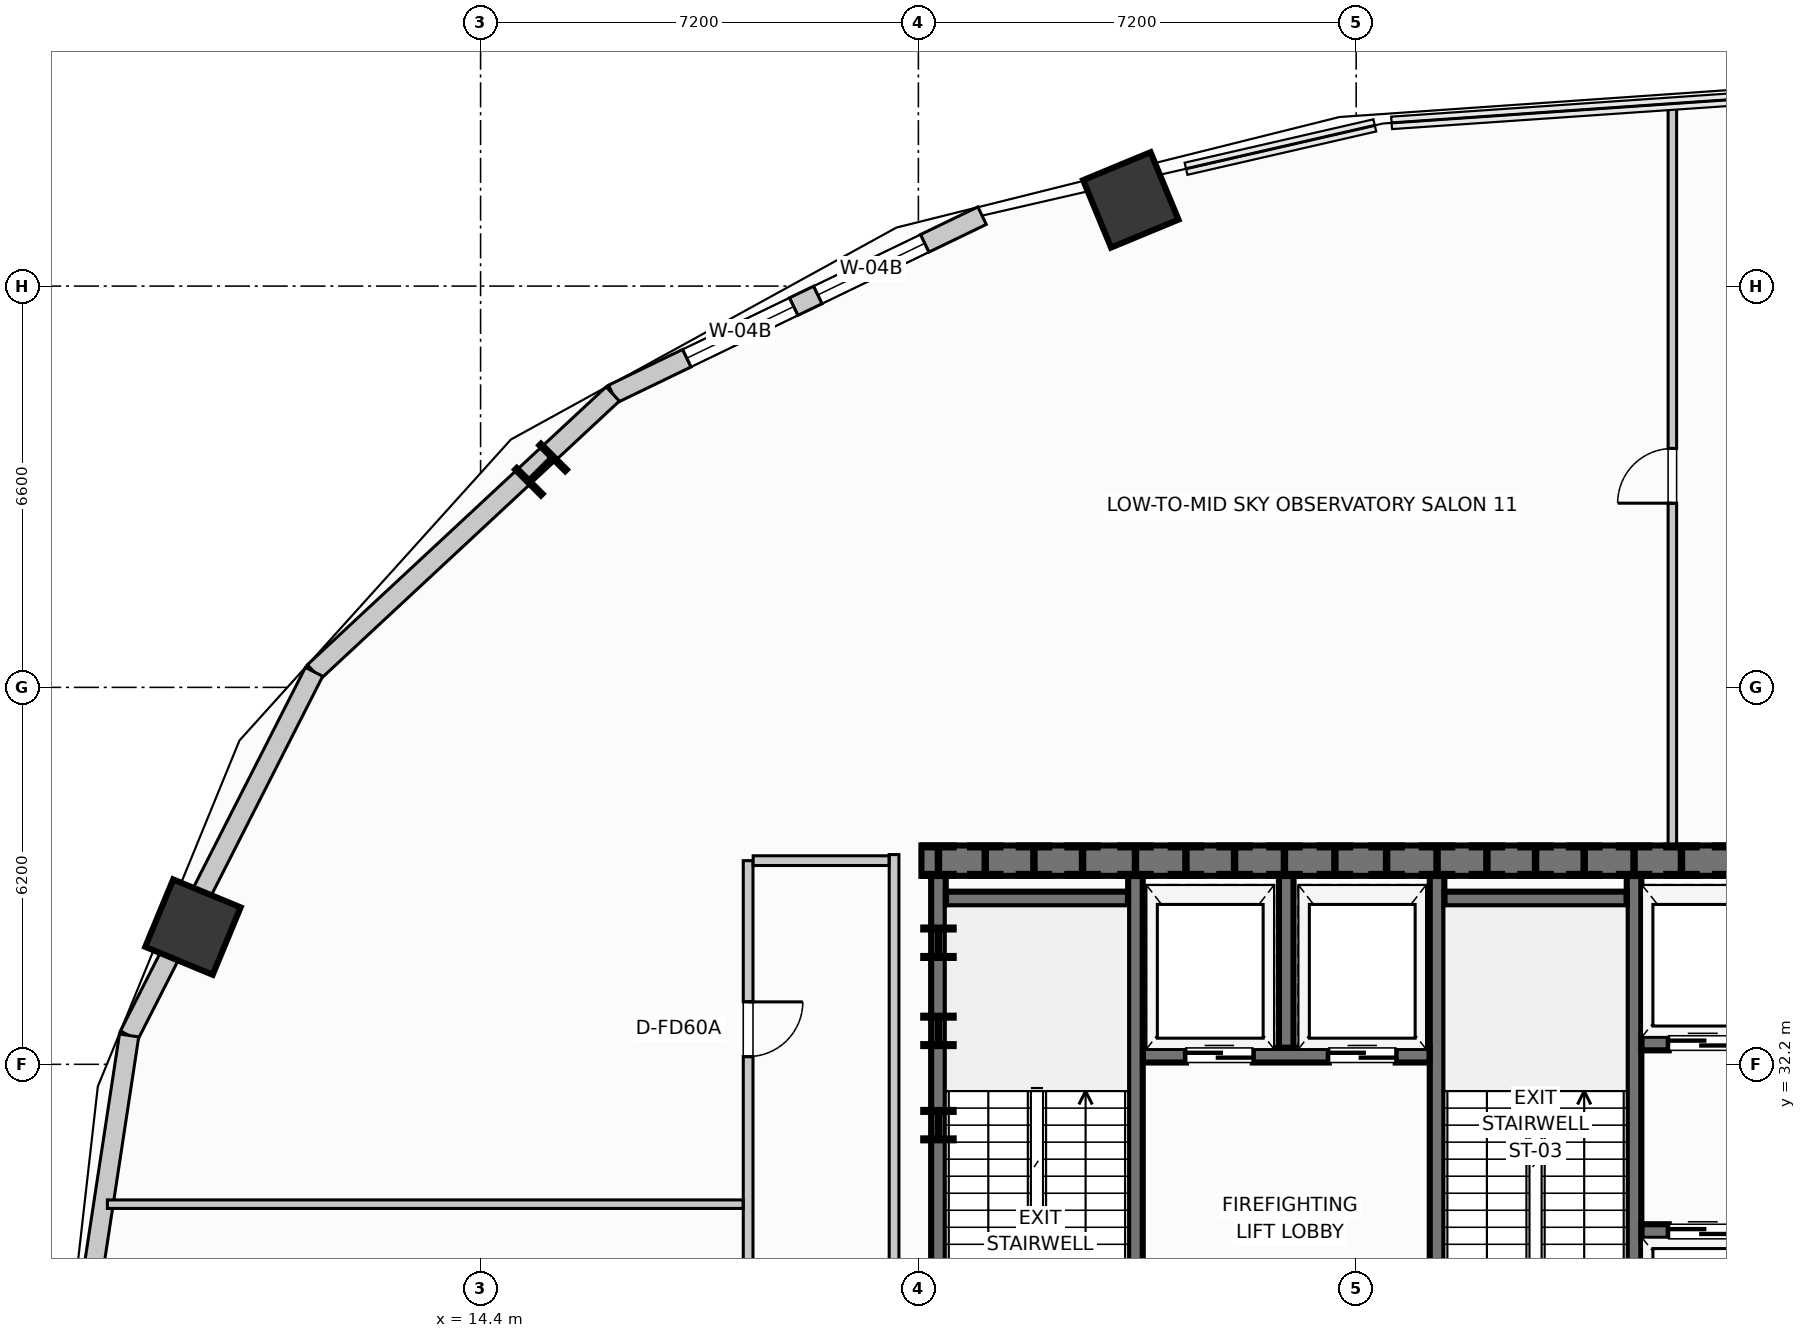
"""IFC4 building model, lengths in metres.
Left out: names, types, materials, properties, quantities, classifications, styles, units other than length and angle.
Written with IfcOpenShell. Run it as: python <this file> out.ifc"""

import sys

from ifc_helpers import new_model, si_unit, direction, frame, frame_2d, origin, origin_2d, place, context, subcontext, project, spatial, rectangle, i_section, extrude, element, fill, save


model = new_model("IFC4")
c1 = context("Model", 3, precision=1e-05, world=origin(), true_north=direction((0.0, 1.0)))
c2 = subcontext(c1, "Body", "Model", "MODEL_VIEW")
j1 = project(units=[si_unit("LENGTHUNIT", "METRE"), si_unit("PLANEANGLEUNIT", "RADIAN")], contexts=[c1])
p1 = place(None, origin())
s1 = spatial("IfcSite", under=j1, at=p1, CompositionType="ELEMENT")
p2 = place(p1, origin())
s2 = spatial("IfcBuilding", under=s1, at=p2, CompositionType="ELEMENT")
p3 = place(p2, frame((0.0, 0.0, 105.95)))
s3 = spatial("IfcBuildingStorey", under=s2, at=p3, CompositionType="ELEMENT", Elevation=105.95)
for number, where, z_axis, x_axis in (
    (1, (21.93, 35.55, 0.0), (0.0, 0.0, 1.0), (1.0, 0.0, 0.0)),
    (2, (23.5, 35.55, 0.0), (0.0, 0.0, 1.0), (1.0, 0.0, 0.0)),
    (3, (25.17, 35.55, 0.0), (0.0, 0.0, 1.0), (1.0, 0.0, 0.0)),
    (4, (26.8, 35.55, 0.0), (0.0, 0.0, 1.0), (1.0, 0.0, 0.0)),
    (5, (28.45, 35.55, 0.0), (0.0, 0.0, 1.0), (1.0, 0.0, 0.0)),
    (6, (30.13, 35.55, 0.0), (0.0, 0.0, 1.0), (1.0, 0.0, 0.0)),
    (7, (31.75, 35.55, 0.0), (0.0, 0.0, 1.0), (1.0, 0.0, 0.0)),
    (8, (33.37, 35.55, 0.0), (0.0, 0.0, 1.0), (1.0, 0.0, 0.0)),
    (9, (34.95, 35.55, 0.0), (0.0, 0.0, 1.0), (1.0, 0.0, 0.0)),
    (10, (21.93, 31.2, 0.0), (0.0, 0.0, 1.0), (1.0, 0.0, 0.0)),
    (11, (21.93, 32.75, 0.0), (0.0, 0.0, 1.0), (1.0, 0.0, 0.0)),
    (12, (21.93, 34.2, 0.0), (0.0, 0.0, 1.0), (1.0, 0.0, 0.0)),
    (13, (22.7, 35.55, 0.0), (0.0, 0.0, 1.0), (1.0, 0.0, 0.0)),
    (14, (27.62, 35.55, 0.0), (0.0, 0.0, 1.0), (1.0, 0.0, 0.0)),
    (15, (32.55, 35.55, 0.0), (0.0, 0.0, 1.0), (1.0, 0.0, 0.0)),
    (16, (24.3, 35.55, 0.0), (0.0, 0.0, 1.0), (1.0, 0.0, 0.0)),
    (17, (26.0, 35.55, 0.0), (0.0, 0.0, 1.0), (1.0, 0.0, 0.0)),
    (18, (29.3, 35.55, 0.0), (0.0, 0.0, 1.0), (1.0, 0.0, 0.0)),
    (19, (30.95, 35.55, 0.0), (0.0, 0.0, 1.0), (1.0, 0.0, 0.0)),
    (20, (34.15, 35.55, 0.0), (0.0, 0.0, 1.0), (1.0, 0.0, 0.0)),
):
    element("IfcColumn", number, at=place(p3, frame(where, z_axis=z_axis, x_axis=x_axis)), inside=s3, PredefinedType="COLUMN", context=c2, shape_type="SweptSolid", body=[
        extrude(i_section(OverallWidth=0.5, OverallDepth=0.5, WebThickness=0.022, FlangeThickness=0.032, at=origin_2d()), origin(), (0.0, 0.0, 1.0), 4.5),
    ])
p4 = place(p3, frame((25.094, 46.418, 0.0), z_axis=(0.0, 0.0, 1.0), x_axis=(-0.382683432365, 0.923879532511, 0.0)))
e21 = element("IfcColumn", 21, at=p4, inside=s3, PredefinedType="COLUMN", context=c2, shape_type="SweptSolid", body=[
    extrude(rectangle(XDim=1.2, YDim=1.2, at=origin_2d()), origin(), (0.0, 0.0, 1.0), 4.5),
])
p5 = place(p3, frame((15.393, 41.982, 0.0), z_axis=(0.0, 0.0, 1.0), x_axis=(-0.707106781187, 0.707106781187, 0.0)))
e22 = element("IfcColumn", 22, at=p5, inside=s3, PredefinedType="COLUMN", context=c2, shape_type="SweptSolid", body=[
    extrude(i_section(OverallWidth=0.6, OverallDepth=0.6, WebThickness=0.025, FlangeThickness=0.036, at=origin_2d()), origin(), (0.0, 0.0, 1.0), 4.5),
])
p6 = place(p3, frame((9.669, 34.457, 0.0), z_axis=(0.0, 0.0, 1.0), x_axis=(-0.923879532511, 0.382683432365, 0.0)))
e23 = element("IfcColumn", 23, at=p6, inside=s3, PredefinedType="COLUMN", context=c2, shape_type="SweptSolid", body=[
    extrude(rectangle(XDim=1.2, YDim=1.2, at=origin_2d()), origin(), (0.0, 0.0, 1.0), 4.5),
])
p7 = place(p3, frame((22.647, 46.158, 0.0), z_axis=(0.0, 0.0, 1.0), x_axis=(-0.900510094661, -0.434835106004, 0.0)))
e24 = element("IfcWall", 24, at=p7, inside=s3, PredefinedType="STANDARD", context=c2, shape_type="SweptSolid", body=[
    extrude(rectangle(XDim=6.745, YDim=0.32, at=frame_2d((3.373, 0.0))), origin(), (0.0, 0.0, 1.0), 4.26),
])
p8 = place(p7, frame((1.048, 0.0, 0.75)))
e25 = element("IfcOpeningElement", 25, at=p8, cuts=e24, PredefinedType="OPENING", context=c2, shape_type="SweptSolid", body=[
    extrude(rectangle(XDim=1.95, YDim=1.68, at=frame_2d((0.975, 0.84))), frame((0.0, 0.17, 0.0), z_axis=(0.0, -1.0, 0.0), x_axis=(1.0, 0.0, 0.0)), (0.0, 0.0, 1.0), 0.34),
])
p9 = place(p7, frame((3.441, 0.0, 0.75)))
e26 = element("IfcOpeningElement", 26, at=p9, cuts=e24, PredefinedType="OPENING", context=c2, shape_type="SweptSolid", body=[
    extrude(rectangle(XDim=1.95, YDim=1.68, at=frame_2d((0.975, 0.84))), frame((0.0, 0.17, 0.0), z_axis=(0.0, -1.0, 0.0), x_axis=(1.0, 0.0, 0.0)), (0.0, 0.0, 1.0), 0.34),
])
p10 = place(p3, frame((16.573, 43.226, 0.0), z_axis=(0.0, 0.0, 1.0), x_axis=(-0.732137360086, -0.681157020052, 0.0)))
e27 = element("IfcWall", 27, at=p10, inside=s3, PredefinedType="STANDARD", context=c2, shape_type="SweptSolid", body=[
    extrude(rectangle(XDim=6.709, YDim=0.32, at=frame_2d((3.354, 0.0))), origin(), (0.0, 0.0, 1.0), 3.619),
])
p11 = place(p3, frame((11.661, 38.656, 0.0), z_axis=(0.0, 0.0, 1.0), x_axis=(-0.453374078001, -0.89132033826, 0.0)))
e28 = element("IfcWall", 28, at=p11, inside=s3, PredefinedType="STANDARD", context=c2, shape_type="SweptSolid", body=[
    extrude(rectangle(XDim=6.71, YDim=0.32, at=frame_2d((3.355, 0.0))), origin(), (0.0, 0.0, 1.0), 3.619),
])
p12 = place(p3, frame((8.619, 32.675, 0.0), z_axis=(0.0, 0.0, 1.0), x_axis=(-0.150633288003, -0.988589708901, 0.0)))
e29 = element("IfcWall", 29, at=p12, inside=s3, PredefinedType="STANDARD", context=c2, shape_type="SweptSolid", body=[
    extrude(rectangle(XDim=6.752, YDim=0.32, at=frame_2d((3.376, 0.0))), origin(), (0.0, 0.0, 1.0), 4.26),
])
p13 = place(p3, frame((50.35, 35.55, 0.0), z_axis=(0.0, 0.0, 1.0), x_axis=(-1.0, 0.0, 0.0)))
e30 = element("IfcWall", 30, at=p13, inside=s3, PredefinedType="SHEAR", context=c2, shape_type="SweptSolid", body=[
    extrude(rectangle(XDim=28.7, YDim=0.5, at=frame_2d((14.35, 0.0))), origin(), (0.0, 0.0, 1.0), 4.5),
])
for number, where, z_axis, x_axis in (
    (31, (21.93, 35.297, 0.0), (0.0, 0.0, 1.0), (0.0, -1.0, 0.0)),
    (32, (25.17, 27.003, 0.0), (0.0, 0.0, 1.0), (0.0, 1.0, 0.0)),
):
    element("IfcWall", number, at=place(p3, frame(where, z_axis=z_axis, x_axis=x_axis)), inside=s3, PredefinedType="SHEAR", context=c2, shape_type="SweptSolid", body=[
        extrude(rectangle(XDim=8.294, YDim=0.24, at=frame_2d((4.147, 0.0))), origin(), (0.0, 0.0, 1.0), 4.5),
    ])
p14 = place(p3, frame((22.053, 34.92, 0.0), z_axis=(0.0, 0.0, 1.0), x_axis=(1.0, 0.0, 0.0)))
e33 = element("IfcWall", 33, at=p14, inside=s3, PredefinedType="SHEAR", context=c2, shape_type="SweptSolid", body=[
    extrude(rectangle(XDim=2.994, YDim=0.24, at=frame_2d((1.497, 0.0))), origin(), (0.0, 0.0, 1.0), 4.5),
])
for number, where, z_axis, x_axis in (
    (34, (30.13, 27.003, 0.0), (0.0, 0.0, 1.0), (0.0, 1.0, 0.0)),
    (35, (33.37, 27.003, 0.0), (0.0, 0.0, 1.0), (0.0, 1.0, 0.0)),
):
    element("IfcWall", number, at=place(p3, frame(where, z_axis=z_axis, x_axis=x_axis)), inside=s3, PredefinedType="SHEAR", context=c2, shape_type="SweptSolid", body=[
        extrude(rectangle(XDim=8.294, YDim=0.24, at=frame_2d((4.147, 0.0))), origin(), (0.0, 0.0, 1.0), 4.5),
    ])
p15 = place(p3, frame((30.253, 34.92, 0.0), z_axis=(0.0, 0.0, 1.0), x_axis=(1.0, 0.0, 0.0)))
e36 = element("IfcWall", 36, at=p15, inside=s3, PredefinedType="SHEAR", context=c2, shape_type="SweptSolid", body=[
    extrude(rectangle(XDim=2.994, YDim=0.24, at=frame_2d((1.497, 0.0))), origin(), (0.0, 0.0, 1.0), 4.5),
])
p16 = place(p3, frame((25.293, 32.35, 0.0), z_axis=(0.0, 0.0, 1.0), x_axis=(1.0, 0.0, 0.0)))
e37 = element("IfcWall", 37, at=p16, inside=s3, PredefinedType="SHEAR", context=c2, shape_type="SweptSolid", body=[
    extrude(rectangle(XDim=4.714, YDim=0.24, at=frame_2d((2.357, 0.0))), origin(), (0.0, 0.0, 1.0), 4.5),
])
p17 = place(p16, frame((0.707, 0.0, 0.0)))
e38 = element("IfcOpeningElement", 38, at=p17, cuts=e37, PredefinedType="OPENING", context=c2, shape_type="SweptSolid", body=[
    extrude(rectangle(XDim=1.1, YDim=2.0, at=frame_2d((0.55, 1.0))), frame((0.0, 0.13, 0.0), z_axis=(0.0, -1.0, 0.0), x_axis=(1.0, 0.0, 0.0)), (0.0, 0.0, 1.0), 0.26),
])
p18 = place(p16, frame((3.057, 0.0, 0.0)))
e39 = element("IfcOpeningElement", 39, at=p18, cuts=e37, PredefinedType="OPENING", context=c2, shape_type="SweptSolid", body=[
    extrude(rectangle(XDim=1.1, YDim=2.0, at=frame_2d((0.55, 1.0))), frame((0.0, 0.13, 0.0), z_axis=(0.0, -1.0, 0.0), x_axis=(1.0, 0.0, 0.0)), (0.0, 0.0, 1.0), 0.26),
])
p19 = place(p3, frame((27.65, 32.473, 0.0), z_axis=(0.0, 0.0, 1.0), x_axis=(0.0, 1.0, 0.0)))
e40 = element("IfcWall", 40, at=p19, inside=s3, PredefinedType="SHEAR", context=c2, shape_type="SweptSolid", body=[
    extrude(rectangle(XDim=2.824, YDim=0.24, at=frame_2d((1.412, 0.0))), origin(), (0.0, 0.0, 1.0), 4.5),
])
p20 = place(p3, frame((33.493, 32.55, 0.0), z_axis=(0.0, 0.0, 1.0), x_axis=(1.0, 0.0, 0.0)))
e41 = element("IfcWall", 41, at=p20, inside=s3, PredefinedType="SHEAR", context=c2, shape_type="SweptSolid", body=[
    extrude(rectangle(XDim=13.214, YDim=0.24, at=frame_2d((6.607, 0.0))), origin(), (0.0, 0.0, 1.0), 4.5),
])
p21 = place(p20, frame((0.447, 0.0, 0.0)))
e42 = element("IfcOpeningElement", 42, at=p21, cuts=e41, PredefinedType="OPENING", context=c2, shape_type="SweptSolid", body=[
    extrude(rectangle(XDim=1.12, YDim=2.0, at=frame_2d((0.56, 1.0))), frame((0.0, 0.13, 0.0), z_axis=(0.0, -1.0, 0.0), x_axis=(1.0, 0.0, 0.0)), (0.0, 0.0, 1.0), 0.26),
])
p22 = place(p20, frame((2.547, 0.0, 0.0)))
e43 = element("IfcOpeningElement", 43, at=p22, cuts=e41, PredefinedType="OPENING", context=c2, shape_type="SweptSolid", body=[
    extrude(rectangle(XDim=1.12, YDim=2.0, at=frame_2d((0.56, 1.0))), frame((0.0, 0.13, 0.0), z_axis=(0.0, -1.0, 0.0), x_axis=(1.0, 0.0, 0.0)), (0.0, 0.0, 1.0), 0.26),
])
p23 = place(p20, frame((4.647, 0.0, 0.0)))
e44 = element("IfcOpeningElement", 44, at=p23, cuts=e41, PredefinedType="OPENING", context=c2, shape_type="SweptSolid", body=[
    extrude(rectangle(XDim=1.12, YDim=2.0, at=frame_2d((0.56, 1.0))), frame((0.0, 0.13, 0.0), z_axis=(0.0, -1.0, 0.0), x_axis=(1.0, 0.0, 0.0)), (0.0, 0.0, 1.0), 0.26),
])
p24 = place(p20, frame((7.497, 0.0, 0.0)))
e45 = element("IfcOpeningElement", 45, at=p24, cuts=e41, PredefinedType="OPENING", context=c2, shape_type="SweptSolid", body=[
    extrude(rectangle(XDim=1.12, YDim=2.0, at=frame_2d((0.56, 1.0))), frame((0.0, 0.13, 0.0), z_axis=(0.0, -1.0, 0.0), x_axis=(1.0, 0.0, 0.0)), (0.0, 0.0, 1.0), 0.26),
])
p25 = place(p20, frame((9.597, 0.0, 0.0)))
e46 = element("IfcOpeningElement", 46, at=p25, cuts=e41, PredefinedType="OPENING", context=c2, shape_type="SweptSolid", body=[
    extrude(rectangle(XDim=1.12, YDim=2.0, at=frame_2d((0.56, 1.0))), frame((0.0, 0.13, 0.0), z_axis=(0.0, -1.0, 0.0), x_axis=(1.0, 0.0, 0.0)), (0.0, 0.0, 1.0), 0.26),
])
p26 = place(p20, frame((11.697, 0.0, 0.0)))
e47 = element("IfcOpeningElement", 47, at=p26, cuts=e41, PredefinedType="OPENING", context=c2, shape_type="SweptSolid", body=[
    extrude(rectangle(XDim=1.12, YDim=2.0, at=frame_2d((0.56, 1.0))), frame((0.0, 0.13, 0.0), z_axis=(0.0, -1.0, 0.0), x_axis=(1.0, 0.0, 0.0)), (0.0, 0.0, 1.0), 0.26),
])
p27 = place(p3, frame((33.493, 29.45, 0.0), z_axis=(0.0, 0.0, 1.0), x_axis=(1.0, 0.0, 0.0)))
e48 = element("IfcWall", 48, at=p27, inside=s3, PredefinedType="SHEAR", context=c2, shape_type="SweptSolid", body=[
    extrude(rectangle(XDim=7.507, YDim=0.24, at=frame_2d((3.753, 0.0))), origin(), (0.0, 0.0, 1.0), 4.5),
])
p28 = place(p27, frame((0.447, 0.0, 0.0)))
e49 = element("IfcOpeningElement", 49, at=p28, cuts=e48, PredefinedType="OPENING", context=c2, shape_type="SweptSolid", body=[
    extrude(rectangle(XDim=1.12, YDim=2.0, at=frame_2d((0.56, 1.0))), frame((0.0, 0.13, 0.0), z_axis=(0.0, -1.0, 0.0), x_axis=(1.0, 0.0, 0.0)), (0.0, 0.0, 1.0), 0.26),
])
p29 = place(p27, frame((2.547, 0.0, 0.0)))
e50 = element("IfcOpeningElement", 50, at=p29, cuts=e48, PredefinedType="OPENING", context=c2, shape_type="SweptSolid", body=[
    extrude(rectangle(XDim=1.12, YDim=2.0, at=frame_2d((0.56, 1.0))), frame((0.0, 0.13, 0.0), z_axis=(0.0, -1.0, 0.0), x_axis=(1.0, 0.0, 0.0)), (0.0, 0.0, 1.0), 0.26),
])
p30 = place(p27, frame((4.647, 0.0, 0.0)))
e51 = element("IfcOpeningElement", 51, at=p30, cuts=e48, PredefinedType="OPENING", context=c2, shape_type="SweptSolid", body=[
    extrude(rectangle(XDim=1.12, YDim=2.0, at=frame_2d((0.56, 1.0))), frame((0.0, 0.13, 0.0), z_axis=(0.0, -1.0, 0.0), x_axis=(1.0, 0.0, 0.0)), (0.0, 0.0, 1.0), 0.26),
])
p31 = place(p3, frame((18.8, 19.8, 0.0), z_axis=(0.0, 0.0, 1.0), x_axis=(0.0, 1.0, 0.0)))
e52 = element("IfcWall", 52, at=p31, inside=s3, PredefinedType="PARTITIONING", context=c2, shape_type="SweptSolid", body=[
    extrude(rectangle(XDim=15.75, YDim=0.16, at=frame_2d((7.875, 0.0))), origin(), (0.0, 0.0, 1.0), 4.245),
])
p32 = place(p31, frame((3.334, 0.0, 0.0)))
e53 = element("IfcOpeningElement", 53, at=p32, cuts=e52, PredefinedType="OPENING", context=c2, shape_type="SweptSolid", body=[
    extrude(rectangle(XDim=0.9, YDim=2.0, at=frame_2d((0.45, 1.0))), frame((0.0, 0.09, 0.0), z_axis=(0.0, -1.0, 0.0), x_axis=(1.0, 0.0, 0.0)), (0.0, 0.0, 1.0), 0.18),
])
p33 = place(p31, frame((12.527, 0.0, 0.0)))
e54 = element("IfcOpeningElement", 54, at=p33, cuts=e52, PredefinedType="OPENING", context=c2, shape_type="SweptSolid", body=[
    extrude(rectangle(XDim=0.9, YDim=2.0, at=frame_2d((0.45, 1.0))), frame((0.0, 0.09, 0.0), z_axis=(0.0, -1.0, 0.0), x_axis=(1.0, 0.0, 0.0)), (0.0, 0.0, 1.0), 0.18),
])
p34 = place(p3, frame((21.2, 26.65, 0.0), z_axis=(0.0, 0.0, 1.0), x_axis=(0.0, 1.0, 0.0)))
e55 = element("IfcWall", 55, at=p34, inside=s3, PredefinedType="PARTITIONING", context=c2, shape_type="SweptSolid", body=[
    extrude(rectangle(XDim=9.0, YDim=0.16, at=frame_2d((4.5, 0.0))), origin(), (0.0, 0.0, 1.0), 4.245),
])
p35 = place(p3, frame((18.883, 35.55, 0.0), z_axis=(0.0, 0.0, 1.0), x_axis=(1.0, 0.0, 0.0)))
e56 = element("IfcWall", 56, at=p35, inside=s3, PredefinedType="PARTITIONING", context=c2, shape_type="SweptSolid", body=[
    extrude(rectangle(XDim=2.234, YDim=0.16, at=frame_2d((1.117, 0.0))), origin(), (0.0, 0.0, 1.0), 4.245),
])
p36 = place(p3, frame((8.262, 29.9, 0.0), z_axis=(0.0, 0.0, 1.0), x_axis=(1.0, 0.0, 0.0)))
e57 = element("IfcWall", 57, at=p36, inside=s3, PredefinedType="PARTITIONING", context=c2, shape_type="SweptSolid", body=[
    extrude(rectangle(XDim=10.455, YDim=0.14, at=frame_2d((5.227, 0.0))), origin(), (0.0, 0.0, 1.0), 4.245),
])
p37 = place(p3, frame((34.0, 35.803, 0.0), z_axis=(0.0, 0.0, 1.0), x_axis=(0.0, 1.0, 0.0)))
e58 = element("IfcWall", 58, at=p37, inside=s3, PredefinedType="PARTITIONING", context=c2, shape_type="SweptSolid", body=[
    extrude(rectangle(XDim=12.133, YDim=0.14, at=frame_2d((6.066, 0.0))), origin(), (0.0, 0.0, 1.0), 4.245),
])
p38 = place(p37, frame((5.626, 0.0, 0.0)))
e59 = element("IfcOpeningElement", 59, at=p38, cuts=e58, PredefinedType="OPENING", context=c2, shape_type="SweptSolid", body=[
    extrude(rectangle(XDim=0.9, YDim=2.0, at=frame_2d((0.45, 1.0))), frame((0.0, 0.08, 0.0), z_axis=(0.0, -1.0, 0.0), x_axis=(1.0, 0.0, 0.0)), (0.0, 0.0, 1.0), 0.16),
])
p39 = place(p8, origin())
e60 = element("IfcWindow", 60, at=p39, inside=s3, PartitioningType="SINGLE_PANEL", PredefinedType="WINDOW", context=c2, shape_type="SweptSolid", body=[
    extrude(rectangle(XDim=1.95, YDim=1.68, at=frame_2d((0.975, 0.84))), frame((0.0, 0.03, 0.0), z_axis=(0.0, -1.0, 0.0), x_axis=(1.0, 0.0, 0.0)), (0.0, 0.0, 1.0), 0.06),
])
fill(e25, e60)
p40 = place(p9, origin())
e61 = element("IfcWindow", 61, at=p40, inside=s3, PartitioningType="SINGLE_PANEL", PredefinedType="WINDOW", context=c2, shape_type="SweptSolid", body=[
    extrude(rectangle(XDim=1.95, YDim=1.68, at=frame_2d((0.975, 0.84))), frame((0.0, 0.03, 0.0), z_axis=(0.0, -1.0, 0.0), x_axis=(1.0, 0.0, 0.0)), (0.0, 0.0, 1.0), 0.06),
])
fill(e26, e61)
p41 = place(p17, origin())
e62 = element("IfcDoor", 62, at=p41, inside=s3, OperationType="DOUBLE_DOOR_SLIDING", PredefinedType="USERDEFINED", context=c2, shape_type="SweptSolid", body=[
    extrude(rectangle(XDim=1.1, YDim=2.0, at=frame_2d((0.55, 1.0))), frame((0.0, 0.025, 0.0), z_axis=(0.0, -1.0, 0.0), x_axis=(1.0, 0.0, 0.0)), (0.0, 0.0, 1.0), 0.05),
])
fill(e38, e62)
p42 = place(p18, origin())
e63 = element("IfcDoor", 63, at=p42, inside=s3, OperationType="DOUBLE_DOOR_SLIDING", PredefinedType="USERDEFINED", context=c2, shape_type="SweptSolid", body=[
    extrude(rectangle(XDim=1.1, YDim=2.0, at=frame_2d((0.55, 1.0))), frame((0.0, 0.025, 0.0), z_axis=(0.0, -1.0, 0.0), x_axis=(1.0, 0.0, 0.0)), (0.0, 0.0, 1.0), 0.05),
])
fill(e39, e63)
p43 = place(p21, origin())
e64 = element("IfcDoor", 64, at=p43, inside=s3, OperationType="DOUBLE_DOOR_SLIDING", PredefinedType="USERDEFINED", context=c2, shape_type="SweptSolid", body=[
    extrude(rectangle(XDim=1.12, YDim=2.0, at=frame_2d((0.56, 1.0))), frame((0.0, 0.025, 0.0), z_axis=(0.0, -1.0, 0.0), x_axis=(1.0, 0.0, 0.0)), (0.0, 0.0, 1.0), 0.05),
])
fill(e42, e64)
p44 = place(p28, origin())
e65 = element("IfcDoor", 65, at=p44, inside=s3, OperationType="DOUBLE_DOOR_SLIDING", PredefinedType="USERDEFINED", context=c2, shape_type="SweptSolid", body=[
    extrude(rectangle(XDim=1.12, YDim=2.0, at=frame_2d((0.56, 1.0))), frame((0.0, 0.025, 0.0), z_axis=(0.0, -1.0, 0.0), x_axis=(1.0, 0.0, 0.0)), (0.0, 0.0, 1.0), 0.05),
])
fill(e49, e65)
p45 = place(p33, frame((0.9, 0.0, 0.0), z_axis=(0.0, 0.0, 1.0), x_axis=(-1.0, 0.0, 0.0)))
e66 = element("IfcDoor", 66, at=p45, inside=s3, OperationType="SINGLE_SWING_LEFT", PredefinedType="DOOR", context=c2, shape_type="SweptSolid", body=[
    extrude(rectangle(XDim=0.9, YDim=2.0, at=frame_2d((0.45, 1.0))), frame((0.0, 0.025, 0.0), z_axis=(0.0, -1.0, 0.0), x_axis=(1.0, 0.0, 0.0)), (0.0, 0.0, 1.0), 0.05),
])
fill(e54, e66)
p46 = place(p38, origin())
e67 = element("IfcDoor", 67, at=p46, inside=s3, OperationType="SINGLE_SWING_LEFT", PredefinedType="DOOR", context=c2, shape_type="SweptSolid", body=[
    extrude(rectangle(XDim=0.9, YDim=2.0, at=frame_2d((0.45, 1.0))), frame((0.0, 0.025, 0.0), z_axis=(0.0, -1.0, 0.0), x_axis=(1.0, 0.0, 0.0)), (0.0, 0.0, 1.0), 0.05),
])
fill(e59, e67)
save(model, sys.argv[1])
